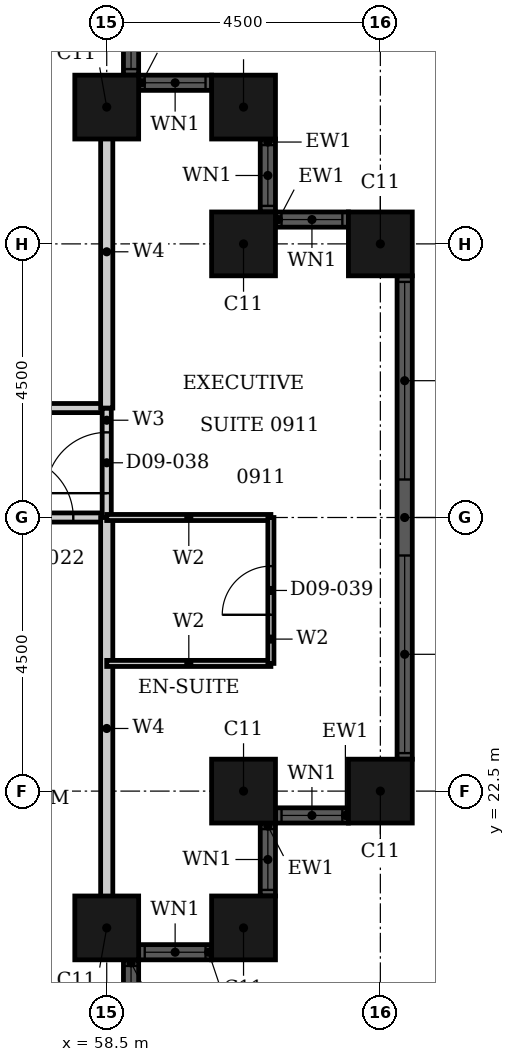
"""IFC4 building model, lengths in metres.
Left out: names, types, materials, properties, quantities, classifications, styles, units other than length and angle.
Written with IfcOpenShell. Run it as: python <this file> out.ifc"""

import sys

from ifc_helpers import new_model, si_unit, direction, frame, frame_2d, origin, origin_2d, place, context, subcontext, project, spatial, rectangle, hollow_rectangle, extrude, element, fill, save


model = new_model("IFC4")
c1 = context("Model", 3, precision=1e-05, world=origin(), true_north=direction((0.0, 1.0)))
c2 = subcontext(c1, "Body", "Model", "MODEL_VIEW")
j1 = project(units=[si_unit("LENGTHUNIT", "METRE"), si_unit("PLANEANGLEUNIT", "RADIAN")], contexts=[c1])
p1 = place(None, origin())
s1 = spatial("IfcSite", under=j1, at=p1, CompositionType="ELEMENT")
p2 = place(p1, origin())
s2 = spatial("IfcBuilding", under=s1, at=p2, CompositionType="ELEMENT")
p3 = place(p2, frame((0.0, 0.0, 44.4)))
s3 = spatial("IfcBuildingStorey", under=s2, at=p3, CompositionType="ELEMENT", Elevation=44.4)
for number, where, z_axis, x_axis in (
    (1, (58.5, 20.25, 0.0), (0.0, 0.0, 1.0), (1.0, 0.0, 0.0)),
    (2, (60.75, 20.25, 0.0), (0.0, 0.0, 1.0), (1.0, 0.0, 0.0)),
    (3, (60.75, 22.5, 0.0), (0.0, 0.0, 1.0), (1.0, 0.0, 0.0)),
    (4, (63.0, 22.5, 0.0), (0.0, 0.0, 1.0), (1.0, 0.0, 0.0)),
    (5, (63.0, 31.5, 0.0), (0.0, 0.0, 1.0), (1.0, 0.0, 0.0)),
    (6, (60.75, 31.5, 0.0), (0.0, 0.0, 1.0), (1.0, 0.0, 0.0)),
    (7, (60.75, 33.75, 0.0), (0.0, 0.0, 1.0), (1.0, 0.0, 0.0)),
    (8, (58.5, 33.75, 0.0), (0.0, 0.0, 1.0), (1.0, 0.0, 0.0)),
):
    element("IfcColumn", number, at=place(p3, frame(where, z_axis=z_axis, x_axis=x_axis)), inside=s3, PredefinedType="COLUMN", context=c2, shape_type="SweptSolid", body=[
        extrude(hollow_rectangle(XDim=1.05, YDim=1.05, WallThickness=0.034, at=origin_2d()), origin(), (0.0, 0.0, 1.0), 3.6),
    ])
p4 = place(p3, frame((58.9, 18.525, 0.0), z_axis=(0.0, 0.0, 1.0), x_axis=(0.0, 1.0, 0.0)))
e9 = element("IfcWall", 9, at=p4, inside=s3, PredefinedType="SOLIDWALL", context=c2, shape_type="SweptSolid", body=[
    extrude(rectangle(XDim=1.2, YDim=0.25, at=frame_2d((0.6, 0.0))), origin(), (0.0, 0.0, 1.0), 3.6),
])
p5 = place(p4, frame((0.1, 0.0, 0.9)))
e10 = element("IfcOpeningElement", 10, at=p5, cuts=e9, PredefinedType="OPENING", context=c2, shape_type="SweptSolid", body=[
    extrude(rectangle(XDim=1.0, YDim=2.08, at=frame_2d((0.5, 1.04))), frame((0.0, 0.135, 0.0), z_axis=(0.0, -1.0, 0.0), x_axis=(1.0, 0.0, 0.0)), (0.0, 0.0, 1.0), 0.27),
])
p6 = place(p3, frame((59.025, 19.85, 0.0), z_axis=(0.0, 0.0, 1.0), x_axis=(1.0, 0.0, 0.0)))
e11 = element("IfcWall", 11, at=p6, inside=s3, PredefinedType="SOLIDWALL", context=c2, shape_type="SweptSolid", body=[
    extrude(rectangle(XDim=1.2, YDim=0.25, at=frame_2d((0.6, 0.0))), origin(), (0.0, 0.0, 1.0), 3.6),
])
p7 = place(p6, frame((0.1, 0.0, 0.9)))
e12 = element("IfcOpeningElement", 12, at=p7, cuts=e11, PredefinedType="OPENING", context=c2, shape_type="SweptSolid", body=[
    extrude(rectangle(XDim=1.0, YDim=2.08, at=frame_2d((0.5, 1.04))), frame((0.0, 0.135, 0.0), z_axis=(0.0, -1.0, 0.0), x_axis=(1.0, 0.0, 0.0)), (0.0, 0.0, 1.0), 0.27),
])
p8 = place(p3, frame((61.15, 20.775, 0.0), z_axis=(0.0, 0.0, 1.0), x_axis=(0.0, 1.0, 0.0)))
e13 = element("IfcWall", 13, at=p8, inside=s3, PredefinedType="SOLIDWALL", context=c2, shape_type="SweptSolid", body=[
    extrude(rectangle(XDim=1.2, YDim=0.25, at=frame_2d((0.6, 0.0))), origin(), (0.0, 0.0, 1.0), 3.6),
])
p9 = place(p8, frame((0.1, 0.0, 0.9)))
e14 = element("IfcOpeningElement", 14, at=p9, cuts=e13, PredefinedType="OPENING", context=c2, shape_type="SweptSolid", body=[
    extrude(rectangle(XDim=1.0, YDim=2.08, at=frame_2d((0.5, 1.04))), frame((0.0, 0.135, 0.0), z_axis=(0.0, -1.0, 0.0), x_axis=(1.0, 0.0, 0.0)), (0.0, 0.0, 1.0), 0.27),
])
p10 = place(p3, frame((61.275, 22.1, 0.0), z_axis=(0.0, 0.0, 1.0), x_axis=(1.0, 0.0, 0.0)))
e15 = element("IfcWall", 15, at=p10, inside=s3, PredefinedType="SOLIDWALL", context=c2, shape_type="SweptSolid", body=[
    extrude(rectangle(XDim=1.2, YDim=0.25, at=frame_2d((0.6, 0.0))), origin(), (0.0, 0.0, 1.0), 3.6),
])
p11 = place(p10, frame((0.1, 0.0, 0.9)))
e16 = element("IfcOpeningElement", 16, at=p11, cuts=e15, PredefinedType="OPENING", context=c2, shape_type="SweptSolid", body=[
    extrude(rectangle(XDim=1.0, YDim=2.08, at=frame_2d((0.5, 1.04))), frame((0.0, 0.135, 0.0), z_axis=(0.0, -1.0, 0.0), x_axis=(1.0, 0.0, 0.0)), (0.0, 0.0, 1.0), 0.27),
])
p12 = place(p3, frame((63.4, 23.025, 0.0), z_axis=(0.0, 0.0, 1.0), x_axis=(0.0, 1.0, 0.0)))
e17 = element("IfcWall", 17, at=p12, inside=s3, PredefinedType="SOLIDWALL", context=c2, shape_type="SweptSolid", body=[
    extrude(rectangle(XDim=7.95, YDim=0.25, at=frame_2d((3.975, 0.0))), origin(), (0.0, 0.0, 1.0), 3.6),
])
p13 = place(p12, frame((0.1, 0.0, 0.9)))
e18 = element("IfcOpeningElement", 18, at=p13, cuts=e17, PredefinedType="OPENING", context=c2, shape_type="SweptSolid", body=[
    extrude(rectangle(XDim=3.25, YDim=2.08, at=frame_2d((1.625, 1.04))), frame((0.0, 0.135, 0.0), z_axis=(0.0, -1.0, 0.0), x_axis=(1.0, 0.0, 0.0)), (0.0, 0.0, 1.0), 0.27),
])
p14 = place(p12, frame((4.6, 0.0, 0.9)))
e19 = element("IfcOpeningElement", 19, at=p14, cuts=e17, PredefinedType="OPENING", context=c2, shape_type="SweptSolid", body=[
    extrude(rectangle(XDim=3.25, YDim=2.08, at=frame_2d((1.625, 1.04))), frame((0.0, 0.135, 0.0), z_axis=(0.0, -1.0, 0.0), x_axis=(1.0, 0.0, 0.0)), (0.0, 0.0, 1.0), 0.27),
])
p15 = place(p3, frame((62.475, 31.9, 0.0), z_axis=(0.0, 0.0, 1.0), x_axis=(-1.0, 0.0, 0.0)))
e20 = element("IfcWall", 20, at=p15, inside=s3, PredefinedType="SOLIDWALL", context=c2, shape_type="SweptSolid", body=[
    extrude(rectangle(XDim=1.2, YDim=0.25, at=frame_2d((0.6, 0.0))), origin(), (0.0, 0.0, 1.0), 3.6),
])
p16 = place(p15, frame((0.1, 0.0, 0.9)))
e21 = element("IfcOpeningElement", 21, at=p16, cuts=e20, PredefinedType="OPENING", context=c2, shape_type="SweptSolid", body=[
    extrude(rectangle(XDim=1.0, YDim=2.08, at=frame_2d((0.5, 1.04))), frame((0.0, 0.135, 0.0), z_axis=(0.0, -1.0, 0.0), x_axis=(1.0, 0.0, 0.0)), (0.0, 0.0, 1.0), 0.27),
])
p17 = place(p3, frame((61.15, 32.025, 0.0), z_axis=(0.0, 0.0, 1.0), x_axis=(0.0, 1.0, 0.0)))
e22 = element("IfcWall", 22, at=p17, inside=s3, PredefinedType="SOLIDWALL", context=c2, shape_type="SweptSolid", body=[
    extrude(rectangle(XDim=1.2, YDim=0.25, at=frame_2d((0.6, 0.0))), origin(), (0.0, 0.0, 1.0), 3.6),
])
p18 = place(p17, frame((0.1, 0.0, 0.9)))
e23 = element("IfcOpeningElement", 23, at=p18, cuts=e22, PredefinedType="OPENING", context=c2, shape_type="SweptSolid", body=[
    extrude(rectangle(XDim=1.0, YDim=2.08, at=frame_2d((0.5, 1.04))), frame((0.0, 0.135, 0.0), z_axis=(0.0, -1.0, 0.0), x_axis=(1.0, 0.0, 0.0)), (0.0, 0.0, 1.0), 0.27),
])
p19 = place(p3, frame((60.225, 34.15, 0.0), z_axis=(0.0, 0.0, 1.0), x_axis=(-1.0, 0.0, 0.0)))
e24 = element("IfcWall", 24, at=p19, inside=s3, PredefinedType="SOLIDWALL", context=c2, shape_type="SweptSolid", body=[
    extrude(rectangle(XDim=1.2, YDim=0.25, at=frame_2d((0.6, 0.0))), origin(), (0.0, 0.0, 1.0), 3.6),
])
p20 = place(p19, frame((0.1, 0.0, 0.9)))
e25 = element("IfcOpeningElement", 25, at=p20, cuts=e24, PredefinedType="OPENING", context=c2, shape_type="SweptSolid", body=[
    extrude(rectangle(XDim=1.0, YDim=2.08, at=frame_2d((0.5, 1.04))), frame((0.0, 0.135, 0.0), z_axis=(0.0, -1.0, 0.0), x_axis=(1.0, 0.0, 0.0)), (0.0, 0.0, 1.0), 0.27),
])
p21 = place(p3, frame((58.9, 34.275, 0.0), z_axis=(0.0, 0.0, 1.0), x_axis=(0.0, 1.0, 0.0)))
e26 = element("IfcWall", 26, at=p21, inside=s3, PredefinedType="SOLIDWALL", context=c2, shape_type="SweptSolid", body=[
    extrude(rectangle(XDim=1.2, YDim=0.25, at=frame_2d((0.6, 0.0))), origin(), (0.0, 0.0, 1.0), 3.6),
])
p22 = place(p21, frame((0.1, 0.0, 0.9)))
e27 = element("IfcOpeningElement", 27, at=p22, cuts=e26, PredefinedType="OPENING", context=c2, shape_type="SweptSolid", body=[
    extrude(rectangle(XDim=1.0, YDim=2.08, at=frame_2d((0.5, 1.04))), frame((0.0, 0.135, 0.0), z_axis=(0.0, -1.0, 0.0), x_axis=(1.0, 0.0, 0.0)), (0.0, 0.0, 1.0), 0.27),
])
p23 = place(p3, frame((46.8, 27.0, 0.0), z_axis=(0.0, 0.0, 1.0), x_axis=(1.0, 0.0, 0.0)))
e28 = element("IfcWall", 28, at=p23, inside=s3, PredefinedType="PARTITIONING", context=c2, shape_type="SweptSolid", body=[
    extrude(rectangle(XDim=11.7, YDim=0.15, at=frame_2d((5.85, 0.0))), origin(), (0.0, 0.0, 1.0), 2.48),
])
p24 = place(p23, frame((5.65, 0.0, 0.0)))
e29 = element("IfcOpeningElement", 29, at=p24, cuts=e28, PredefinedType="OPENING", context=c2, shape_type="SweptSolid", body=[
    extrude(rectangle(XDim=1.0, YDim=2.1, at=frame_2d((0.5, 1.05))), frame((0.0, 0.085, 0.0), z_axis=(0.0, -1.0, 0.0), x_axis=(1.0, 0.0, 0.0)), (0.0, 0.0, 1.0), 0.17),
])
p25 = place(p23, frame((10.15, 0.0, 0.0)))
e30 = element("IfcOpeningElement", 30, at=p25, cuts=e28, PredefinedType="OPENING", context=c2, shape_type="SweptSolid", body=[
    extrude(rectangle(XDim=1.0, YDim=2.1, at=frame_2d((0.5, 1.05))), frame((0.0, 0.085, 0.0), z_axis=(0.0, -1.0, 0.0), x_axis=(1.0, 0.0, 0.0)), (0.0, 0.0, 1.0), 0.17),
])
p26 = place(p3, frame((46.8, 28.8, 0.0), z_axis=(0.0, 0.0, 1.0), x_axis=(1.0, 0.0, 0.0)))
e31 = element("IfcWall", 31, at=p26, inside=s3, PredefinedType="PARTITIONING", context=c2, shape_type="SweptSolid", body=[
    extrude(rectangle(XDim=11.7, YDim=0.15, at=frame_2d((5.85, 0.0))), origin(), (0.0, 0.0, 1.0), 3.2),
])
p27 = place(p26, frame((4.45, 0.0, 0.0)))
e32 = element("IfcOpeningElement", 32, at=p27, cuts=e31, PredefinedType="OPENING", context=c2, shape_type="SweptSolid", body=[
    extrude(rectangle(XDim=1.0, YDim=2.1, at=frame_2d((0.5, 1.05))), frame((0.0, 0.085, 0.0), z_axis=(0.0, -1.0, 0.0), x_axis=(1.0, 0.0, 0.0)), (0.0, 0.0, 1.0), 0.17),
])
p28 = place(p3, frame((58.5, 27.0, 0.0), z_axis=(0.0, 0.0, 1.0), x_axis=(0.0, 1.0, 0.0)))
e33 = element("IfcWall", 33, at=p28, inside=s3, PredefinedType="PARTITIONING", context=c2, shape_type="SweptSolid", body=[
    extrude(rectangle(XDim=1.8, YDim=0.15, at=frame_2d((0.9, 0.0))), origin(), (0.0, 0.0, 1.0), 3.2),
])
p29 = place(p28, frame((0.4, 0.0, 0.0)))
e34 = element("IfcOpeningElement", 34, at=p29, cuts=e33, PredefinedType="OPENING", context=c2, shape_type="SweptSolid", body=[
    extrude(rectangle(XDim=1.0, YDim=2.1, at=frame_2d((0.5, 1.05))), frame((0.0, 0.085, 0.0), z_axis=(0.0, -1.0, 0.0), x_axis=(1.0, 0.0, 0.0)), (0.0, 0.0, 1.0), 0.17),
])
p30 = place(p3, frame((58.5, 20.06, 0.0), z_axis=(0.0, 0.0, 1.0), x_axis=(0.0, 1.0, 0.0)))
e35 = element("IfcWall", 35, at=p30, inside=s3, PredefinedType="PARTITIONING", context=c2, shape_type="SweptSolid", body=[
    extrude(rectangle(XDim=6.94, YDim=0.2, at=frame_2d((3.47, 0.0))), origin(), (0.0, 0.0, 1.0), 3.2),
])
p31 = place(p3, frame((58.5, 28.8, 0.0), z_axis=(0.0, 0.0, 1.0), x_axis=(0.0, 1.0, 0.0)))
e36 = element("IfcWall", 36, at=p31, inside=s3, PredefinedType="PARTITIONING", context=c2, shape_type="SweptSolid", body=[
    extrude(rectangle(XDim=5.14, YDim=0.2, at=frame_2d((2.57, 0.0))), origin(), (0.0, 0.0, 1.0), 3.2),
])
p32 = place(p3, frame((58.5, 24.6, 0.0), z_axis=(0.0, 0.0, 1.0), x_axis=(1.0, 0.0, 0.0)))
e37 = element("IfcWall", 37, at=p32, inside=s3, PredefinedType="PARTITIONING", context=c2, shape_type="SweptSolid", body=[
    extrude(rectangle(XDim=2.7, YDim=0.1, at=frame_2d((1.35, 0.0))), origin(), (0.0, 0.0, 1.0), 3.2),
])
p33 = place(p3, frame((58.5, 27.0, 0.0), z_axis=(0.0, 0.0, 1.0), x_axis=(1.0, 0.0, 0.0)))
e38 = element("IfcWall", 38, at=p33, inside=s3, PredefinedType="PARTITIONING", context=c2, shape_type="SweptSolid", body=[
    extrude(rectangle(XDim=2.7, YDim=0.1, at=frame_2d((1.35, 0.0))), origin(), (0.0, 0.0, 1.0), 2.48),
])
p34 = place(p3, frame((61.2, 24.6, 0.0), z_axis=(0.0, 0.0, 1.0), x_axis=(0.0, 1.0, 0.0)))
e39 = element("IfcWall", 39, at=p34, inside=s3, PredefinedType="PARTITIONING", context=c2, shape_type="SweptSolid", body=[
    extrude(rectangle(XDim=2.4, YDim=0.1, at=frame_2d((1.2, 0.0))), origin(), (0.0, 0.0, 1.0), 3.2),
])
p35 = place(p34, frame((0.8, 0.0, 0.0)))
e40 = element("IfcOpeningElement", 40, at=p35, cuts=e39, PredefinedType="OPENING", context=c2, shape_type="SweptSolid", body=[
    extrude(rectangle(XDim=0.8, YDim=2.1, at=frame_2d((0.4, 1.05))), frame((0.0, 0.06, 0.0), z_axis=(0.0, -1.0, 0.0), x_axis=(1.0, 0.0, 0.0)), (0.0, 0.0, 1.0), 0.12),
])
p36 = place(p5, origin())
e41 = element("IfcWindow", 41, at=p36, inside=s3, PartitioningType="SINGLE_PANEL", PredefinedType="WINDOW", context=c2, shape_type="SweptSolid", body=[
    extrude(rectangle(XDim=1.0, YDim=2.08, at=frame_2d((0.5, 1.04))), frame((0.0, 0.03, 0.0), z_axis=(0.0, -1.0, 0.0), x_axis=(1.0, 0.0, 0.0)), (0.0, 0.0, 1.0), 0.06),
])
fill(e10, e41)
p37 = place(p7, origin())
e42 = element("IfcWindow", 42, at=p37, inside=s3, PartitioningType="SINGLE_PANEL", PredefinedType="WINDOW", context=c2, shape_type="SweptSolid", body=[
    extrude(rectangle(XDim=1.0, YDim=2.08, at=frame_2d((0.5, 1.04))), frame((0.0, 0.03, 0.0), z_axis=(0.0, -1.0, 0.0), x_axis=(1.0, 0.0, 0.0)), (0.0, 0.0, 1.0), 0.06),
])
fill(e12, e42)
p38 = place(p9, origin())
e43 = element("IfcWindow", 43, at=p38, inside=s3, PartitioningType="SINGLE_PANEL", PredefinedType="WINDOW", context=c2, shape_type="SweptSolid", body=[
    extrude(rectangle(XDim=1.0, YDim=2.08, at=frame_2d((0.5, 1.04))), frame((0.0, 0.03, 0.0), z_axis=(0.0, -1.0, 0.0), x_axis=(1.0, 0.0, 0.0)), (0.0, 0.0, 1.0), 0.06),
])
fill(e14, e43)
p39 = place(p11, origin())
e44 = element("IfcWindow", 44, at=p39, inside=s3, PartitioningType="SINGLE_PANEL", PredefinedType="WINDOW", context=c2, shape_type="SweptSolid", body=[
    extrude(rectangle(XDim=1.0, YDim=2.08, at=frame_2d((0.5, 1.04))), frame((0.0, 0.03, 0.0), z_axis=(0.0, -1.0, 0.0), x_axis=(1.0, 0.0, 0.0)), (0.0, 0.0, 1.0), 0.06),
])
fill(e16, e44)
p40 = place(p13, origin())
e45 = element("IfcWindow", 45, at=p40, inside=s3, PartitioningType="SINGLE_PANEL", PredefinedType="WINDOW", context=c2, shape_type="SweptSolid", body=[
    extrude(rectangle(XDim=3.25, YDim=2.08, at=frame_2d((1.625, 1.04))), frame((0.0, 0.03, 0.0), z_axis=(0.0, -1.0, 0.0), x_axis=(1.0, 0.0, 0.0)), (0.0, 0.0, 1.0), 0.06),
])
fill(e18, e45)
p41 = place(p14, origin())
e46 = element("IfcWindow", 46, at=p41, inside=s3, PartitioningType="SINGLE_PANEL", PredefinedType="WINDOW", context=c2, shape_type="SweptSolid", body=[
    extrude(rectangle(XDim=3.25, YDim=2.08, at=frame_2d((1.625, 1.04))), frame((0.0, 0.03, 0.0), z_axis=(0.0, -1.0, 0.0), x_axis=(1.0, 0.0, 0.0)), (0.0, 0.0, 1.0), 0.06),
])
fill(e19, e46)
p42 = place(p16, origin())
e47 = element("IfcWindow", 47, at=p42, inside=s3, PartitioningType="SINGLE_PANEL", PredefinedType="WINDOW", context=c2, shape_type="SweptSolid", body=[
    extrude(rectangle(XDim=1.0, YDim=2.08, at=frame_2d((0.5, 1.04))), frame((0.0, 0.03, 0.0), z_axis=(0.0, -1.0, 0.0), x_axis=(1.0, 0.0, 0.0)), (0.0, 0.0, 1.0), 0.06),
])
fill(e21, e47)
p43 = place(p18, origin())
e48 = element("IfcWindow", 48, at=p43, inside=s3, PartitioningType="SINGLE_PANEL", PredefinedType="WINDOW", context=c2, shape_type="SweptSolid", body=[
    extrude(rectangle(XDim=1.0, YDim=2.08, at=frame_2d((0.5, 1.04))), frame((0.0, 0.03, 0.0), z_axis=(0.0, -1.0, 0.0), x_axis=(1.0, 0.0, 0.0)), (0.0, 0.0, 1.0), 0.06),
])
fill(e23, e48)
p44 = place(p20, origin())
e49 = element("IfcWindow", 49, at=p44, inside=s3, PartitioningType="SINGLE_PANEL", PredefinedType="WINDOW", context=c2, shape_type="SweptSolid", body=[
    extrude(rectangle(XDim=1.0, YDim=2.08, at=frame_2d((0.5, 1.04))), frame((0.0, 0.03, 0.0), z_axis=(0.0, -1.0, 0.0), x_axis=(1.0, 0.0, 0.0)), (0.0, 0.0, 1.0), 0.06),
])
fill(e25, e49)
p45 = place(p22, origin())
e50 = element("IfcWindow", 50, at=p45, inside=s3, PartitioningType="SINGLE_PANEL", PredefinedType="WINDOW", context=c2, shape_type="SweptSolid", body=[
    extrude(rectangle(XDim=1.0, YDim=2.08, at=frame_2d((0.5, 1.04))), frame((0.0, 0.03, 0.0), z_axis=(0.0, -1.0, 0.0), x_axis=(1.0, 0.0, 0.0)), (0.0, 0.0, 1.0), 0.06),
])
fill(e27, e50)
p46 = place(p25, origin())
e51 = element("IfcDoor", 51, at=p46, inside=s3, OperationType="SINGLE_SWING_RIGHT", PredefinedType="DOOR", context=c2, shape_type="SweptSolid", body=[
    extrude(rectangle(XDim=1.0, YDim=2.1, at=frame_2d((0.5, 1.05))), frame((0.0, 0.025, 0.0), z_axis=(0.0, -1.0, 0.0), x_axis=(1.0, 0.0, 0.0)), (0.0, 0.0, 1.0), 0.05),
])
fill(e30, e51)
p47 = place(p29, origin())
e52 = element("IfcDoor", 52, at=p47, inside=s3, OperationType="SINGLE_SWING_LEFT", PredefinedType="DOOR", context=c2, shape_type="SweptSolid", body=[
    extrude(rectangle(XDim=1.0, YDim=2.1, at=frame_2d((0.5, 1.05))), frame((0.0, 0.025, 0.0), z_axis=(0.0, -1.0, 0.0), x_axis=(1.0, 0.0, 0.0)), (0.0, 0.0, 1.0), 0.05),
])
fill(e34, e52)
p48 = place(p35, origin())
e53 = element("IfcDoor", 53, at=p48, inside=s3, OperationType="SINGLE_SWING_RIGHT", PredefinedType="DOOR", context=c2, shape_type="SweptSolid", body=[
    extrude(rectangle(XDim=0.8, YDim=2.1, at=frame_2d((0.4, 1.05))), frame((0.0, 0.025, 0.0), z_axis=(0.0, -1.0, 0.0), x_axis=(1.0, 0.0, 0.0)), (0.0, 0.0, 1.0), 0.05),
])
fill(e40, e53)
save(model, sys.argv[1])
